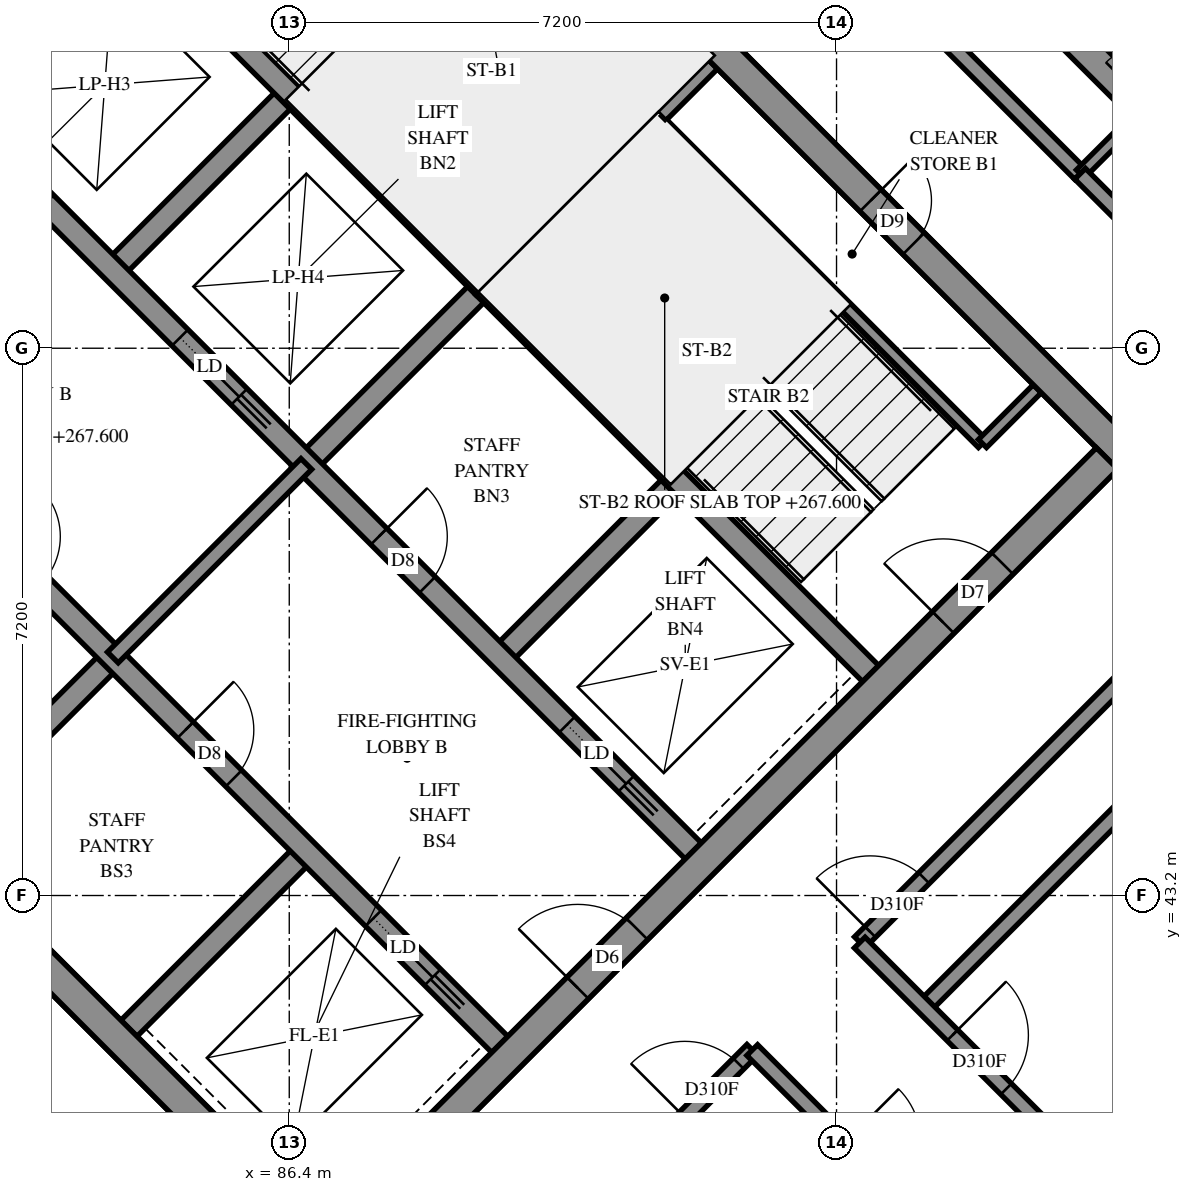
"""IFC4 building model, lengths in metres.
Left out: names, types, materials, properties, quantities, classifications, styles, units other than length and angle.
Written with IfcOpenShell. Run it as: python <this file> out.ifc"""

import sys

from ifc_helpers import new_model, si_unit, direction, frame, frame_2d, origin, place, context, subcontext, project, spatial, rectangle, extrude, element, fill, save


model = new_model("IFC4")
c1 = context("Model", 3, precision=1e-05, world=origin(), true_north=direction((0.0, 1.0)))
c2 = subcontext(c1, "Body", "Model", "MODEL_VIEW")
j1 = project(units=[si_unit("LENGTHUNIT", "METRE"), si_unit("PLANEANGLEUNIT", "RADIAN")], contexts=[c1])
p1 = place(None, origin())
s1 = spatial("IfcSite", under=j1, at=p1, CompositionType="ELEMENT")
p2 = place(p1, origin())
s2 = spatial("IfcBuilding", under=s1, at=p2, CompositionType="ELEMENT")
p3 = place(p2, frame((0.0, 0.0, 267.6)))
s3 = spatial("IfcBuildingStorey", under=s2, at=p3, CompositionType="ELEMENT", Elevation=267.6)
p4 = place(p3, frame((76.23, 49.231, -0.3), z_axis=(0.0, 0.0, 1.0), x_axis=(0.7071034917, -0.7071100706, 0.0)))
e1 = element("IfcWall", 1, at=p4, inside=s3, PredefinedType="SHEAR", context=c2, shape_type="SweptSolid", body=[
    extrude(rectangle(XDim=15.2, YDim=0.4, at=frame_2d((7.6, 0.0))), origin(), (0.0, 0.0, 1.0), 2.7),
])
p5 = place(p3, frame((86.695, 59.696, -0.3), z_axis=(0.0, 0.0, 1.0), x_axis=(0.7071100706, -0.7071034917, 0.0)))
e2 = element("IfcWall", 2, at=p5, inside=s3, PredefinedType="SHEAR", context=c2, shape_type="SweptSolid", body=[
    extrude(rectangle(XDim=15.2, YDim=0.4, at=frame_2d((7.6, 0.0))), origin(), (0.0, 0.0, 1.0), 2.7),
])
p6 = place(p5, frame((10.4, 0.0, 0.3)))
e3 = element("IfcOpeningElement", 3, at=p6, cuts=e2, PredefinedType="OPENING", context=c2, shape_type="SweptSolid", body=[
    extrude(rectangle(XDim=0.8, YDim=2.1, at=frame_2d((0.4, 1.05))), frame((0.0, 0.21, 0.0), z_axis=(0.0, -1.0, 0.0), x_axis=(1.0, 0.0, 0.0)), (0.0, 0.0, 1.0), 0.42),
])
p7 = place(p3, frame((76.513, 49.231, -0.3), z_axis=(0.0, 0.0, 1.0), x_axis=(0.7071067812, 0.7071067812, 0.0)))
e4 = element("IfcWall", 4, at=p7, inside=s3, PredefinedType="SHEAR", context=c2, shape_type="SweptSolid", body=[
    extrude(rectangle(XDim=14.4, YDim=0.4, at=frame_2d((7.2, 0.0))), origin(), (0.0, 0.0, 1.0), 2.7),
])
p8 = place(p7, frame((5.65, 0.0, 0.3)))
e5 = element("IfcOpeningElement", 5, at=p8, cuts=e4, PredefinedType="OPENING", context=c2, shape_type="SweptSolid", body=[
    extrude(rectangle(XDim=1.1, YDim=2.1, at=frame_2d((0.55, 1.05))), frame((0.0, 0.21, 0.0), z_axis=(0.0, -1.0, 0.0), x_axis=(1.0, 0.0, 0.0)), (0.0, 0.0, 1.0), 0.42),
])
p9 = place(p7, frame((11.35, 0.0, 0.3)))
e6 = element("IfcOpeningElement", 6, at=p9, cuts=e4, PredefinedType="OPENING", context=c2, shape_type="SweptSolid", body=[
    extrude(rectangle(XDim=1.1, YDim=2.1, at=frame_2d((0.55, 1.05))), frame((0.0, 0.21, 0.0), z_axis=(0.0, -1.0, 0.0), x_axis=(1.0, 0.0, 0.0)), (0.0, 0.0, 1.0), 0.42),
])
p10 = place(p7, frame((0.25, 0.0, 0.0)))
e7 = element("IfcOpeningElement", 7, at=p10, cuts=e4, PredefinedType="OPENING", context=c2, shape_type="SweptSolid", body=[
    extrude(rectangle(XDim=0.9, YDim=2.1, at=frame_2d((0.45, 1.05))), frame((0.0, 0.21, 0.0), z_axis=(0.0, -1.0, 0.0), x_axis=(1.0, 0.0, 0.0)), (0.0, 0.0, 1.0), 0.42),
])
p11 = place(p3, frame((86.978, 38.766, -0.3), z_axis=(0.0, 0.0, 1.0), x_axis=(0.7071067812, 0.7071067812, 0.0)))
e8 = element("IfcWall", 8, at=p11, inside=s3, PredefinedType="SHEAR", context=c2, shape_type="SweptSolid", body=[
    extrude(rectangle(XDim=14.4, YDim=0.4, at=frame_2d((7.2, 0.0))), origin(), (0.0, 0.0, 1.0), 2.7),
])
p12 = place(p11, frame((4.55, 0.0, 0.3)))
e9 = element("IfcOpeningElement", 9, at=p12, cuts=e8, PredefinedType="OPENING", context=c2, shape_type="SweptSolid", body=[
    extrude(rectangle(XDim=1.1, YDim=2.1, at=frame_2d((0.55, 1.05))), frame((0.0, 0.21, 0.0), z_axis=(0.0, -1.0, 0.0), x_axis=(1.0, 0.0, 0.0)), (0.0, 0.0, 1.0), 0.42),
])
p13 = place(p11, frame((11.35, 0.0, 0.3)))
e10 = element("IfcOpeningElement", 10, at=p13, cuts=e8, PredefinedType="OPENING", context=c2, shape_type="SweptSolid", body=[
    extrude(rectangle(XDim=1.1, YDim=2.1, at=frame_2d((0.55, 1.05))), frame((0.0, 0.21, 0.0), z_axis=(0.0, -1.0, 0.0), x_axis=(1.0, 0.0, 0.0)), (0.0, 0.0, 1.0), 0.42),
])
p14 = place(p3, frame((84.079, 51.423, 0.0), z_axis=(0.0, 0.0, 1.0), x_axis=(0.7071219326, 0.7070916295, 0.0)))
e11 = element("IfcWall", 11, at=p14, inside=s3, PredefinedType="SOLIDWALL", context=c2, shape_type="SweptSolid", body=[
    extrude(rectangle(XDim=3.3, YDim=0.3, at=frame_2d((1.65, 0.0))), origin(), (0.0, 0.0, 1.0), 3.1),
])
p15 = place(p3, frame((81.746, 43.999, 0.0), z_axis=(0.0, 0.0, 1.0), x_axis=(0.7071067812, 0.7071067812, 0.0)))
e12 = element("IfcWall", 12, at=p15, inside=s3, PredefinedType="SOLIDWALL", context=c2, shape_type="SweptSolid", body=[
    extrude(rectangle(XDim=3.3, YDim=0.3, at=frame_2d((1.65, 0.0))), origin(), (0.0, 0.0, 1.0), 3.1),
])
p16 = place(p3, frame((86.625, 48.878, 0.0), z_axis=(0.0, 0.0, 1.0), x_axis=(0.7071067812, 0.7071067812, 0.0)))
e13 = element("IfcWall", 13, at=p16, inside=s3, PredefinedType="SOLIDWALL", context=c2, shape_type="SweptSolid", body=[
    extrude(rectangle(XDim=3.3, YDim=0.3, at=frame_2d((1.65, 0.0))), origin(), (0.0, 0.0, 1.0), 3.1),
])
p17 = place(p3, frame((84.291, 41.453, 0.0), z_axis=(0.0, 0.0, 1.0), x_axis=(0.7071067812, 0.7071067812, 0.0)))
e14 = element("IfcWall", 14, at=p17, inside=s3, PredefinedType="SOLIDWALL", context=c2, shape_type="SweptSolid", body=[
    extrude(rectangle(XDim=3.3, YDim=0.3, at=frame_2d((1.65, 0.0))), origin(), (0.0, 0.0, 1.0), 3.1),
])
p18 = place(p3, frame((89.17, 46.332, 0.0), z_axis=(0.0, 0.0, 1.0), x_axis=(0.7071067812, 0.7071067812, 0.0)))
e15 = element("IfcWall", 15, at=p18, inside=s3, PredefinedType="SOLIDWALL", context=c2, shape_type="SweptSolid", body=[
    extrude(rectangle(XDim=3.3, YDim=0.3, at=frame_2d((1.65, 0.0))), origin(), (0.0, 0.0, 1.0), 3.1),
])
p19 = place(p3, frame((78.988, 51.423, 0.0), z_axis=(0.0, 0.0, 1.0), x_axis=(0.7071067812, -0.7071067812, 0.0)))
e16 = element("IfcWall", 16, at=p19, inside=s3, PredefinedType="SOLIDWALL", context=c2, shape_type="SweptSolid", body=[
    extrude(rectangle(XDim=14.4, YDim=0.3, at=frame_2d((7.2, 0.0))), origin(), (0.0, 0.0, 1.0), 3.1),
])
p20 = place(p19, frame((4.95, 0.0, 0.0)))
e17 = element("IfcOpeningElement", 17, at=p20, cuts=e16, PredefinedType="OPENING", context=c2, shape_type="SweptSolid", body=[
    extrude(rectangle(XDim=0.9, YDim=2.1, at=frame_2d((0.45, 1.05))), frame((0.0, 0.16, 0.0), z_axis=(0.0, -1.0, 0.0), x_axis=(1.0, 0.0, 0.0)), (0.0, 0.0, 1.0), 0.32),
])
p21 = place(p19, frame((8.55, 0.0, 0.0)))
e18 = element("IfcOpeningElement", 18, at=p21, cuts=e16, PredefinedType="OPENING", context=c2, shape_type="SweptSolid", body=[
    extrude(rectangle(XDim=0.9, YDim=2.1, at=frame_2d((0.45, 1.05))), frame((0.0, 0.16, 0.0), z_axis=(0.0, -1.0, 0.0), x_axis=(1.0, 0.0, 0.0)), (0.0, 0.0, 1.0), 0.32),
])
p22 = place(p19, frame((12.05, 0.0, 0.0)))
e19 = element("IfcOpeningElement", 19, at=p22, cuts=e16, PredefinedType="OPENING", context=c2, shape_type="SweptSolid", body=[
    extrude(rectangle(XDim=1.1, YDim=2.1, at=frame_2d((0.55, 1.05))), frame((0.0, 0.16, 0.0), z_axis=(0.0, -1.0, 0.0), x_axis=(1.0, 0.0, 0.0)), (0.0, 0.0, 1.0), 0.32),
])
p23 = place(p3, frame((81.534, 53.969, 0.0), z_axis=(0.0, 0.0, 1.0), x_axis=(0.707103309, -0.7071102534, 0.0)))
e20 = element("IfcWall", 20, at=p23, inside=s3, PredefinedType="SOLIDWALL", context=c2, shape_type="SweptSolid", body=[
    extrude(rectangle(XDim=14.4, YDim=0.3, at=frame_2d((7.2, 0.0))), origin(), (0.0, 0.0, 1.0), 3.1),
])
p24 = place(p23, frame((8.55, 0.0, 0.0)))
e21 = element("IfcOpeningElement", 21, at=p24, cuts=e20, PredefinedType="OPENING", context=c2, shape_type="SweptSolid", body=[
    extrude(rectangle(XDim=0.9, YDim=2.1, at=frame_2d((0.45, 1.05))), frame((0.0, 0.16, 0.0), z_axis=(0.0, -1.0, 0.0), x_axis=(1.0, 0.0, 0.0)), (0.0, 0.0, 1.0), 0.32),
])
p25 = place(p23, frame((1.25, 0.0, 0.0)))
e22 = element("IfcOpeningElement", 22, at=p25, cuts=e20, PredefinedType="OPENING", context=c2, shape_type="SweptSolid", body=[
    extrude(rectangle(XDim=1.1, YDim=2.1, at=frame_2d((0.55, 1.05))), frame((0.0, 0.16, 0.0), z_axis=(0.0, -1.0, 0.0), x_axis=(1.0, 0.0, 0.0)), (0.0, 0.0, 1.0), 0.32),
])
p26 = place(p23, frame((4.85, 0.0, 0.0)))
e23 = element("IfcOpeningElement", 23, at=p26, cuts=e20, PredefinedType="OPENING", context=c2, shape_type="SweptSolid", body=[
    extrude(rectangle(XDim=1.1, YDim=2.1, at=frame_2d((0.55, 1.05))), frame((0.0, 0.16, 0.0), z_axis=(0.0, -1.0, 0.0), x_axis=(1.0, 0.0, 0.0)), (0.0, 0.0, 1.0), 0.32),
])
p27 = place(p23, frame((12.05, 0.0, 0.0)))
e24 = element("IfcOpeningElement", 24, at=p27, cuts=e20, PredefinedType="OPENING", context=c2, shape_type="SweptSolid", body=[
    extrude(rectangle(XDim=1.1, YDim=2.1, at=frame_2d((0.55, 1.05))), frame((0.0, 0.16, 0.0), z_axis=(0.0, -1.0, 0.0), x_axis=(1.0, 0.0, 0.0)), (0.0, 0.0, 1.0), 0.32),
])
for number, where, z_axis, x_axis in (
    (25, (83.867, 56.302, 0.0), (0.0, 0.0, 1.0), (0.707, -0.707, 0.0)),
    (26, (88.958, 51.211, 0.0), (0.0, 0.0, 1.0), (0.707, -0.707, 0.0)),
):
    element("IfcWall", number, at=place(p3, frame(where, z_axis=z_axis, x_axis=x_axis)), inside=s3, PredefinedType="SOLIDWALL", context=c2, shape_type="SweptSolid", body=[
        extrude(rectangle(XDim=7.2, YDim=0.3, at=frame_2d((3.6, 0.0))), origin(), (0.0, 0.0, 1.0), 3.1),
    ])
p28 = place(p3, frame((88.958, 51.211, 0.0), z_axis=(0.0, 0.0, 1.0), x_axis=(0.7071067812, 0.7071067812, 0.0)))
e27 = element("IfcWall", 27, at=p28, inside=s3, PredefinedType="SOLIDWALL", context=c2, shape_type="SweptSolid", body=[
    extrude(rectangle(XDim=4.2, YDim=0.3, at=frame_2d((2.1, 0.0))), origin(), (0.0, 0.0, 1.0), 3.1),
])
p29 = place(p3, frame((91.313, 53.354, 0.0), z_axis=(0.0, 0.0, 1.0), x_axis=(0.7071067812, -0.7071067812, 0.0)))
e28 = element("IfcWall", 28, at=p29, inside=s3, PredefinedType="PARTITIONING", context=c2, shape_type="SweptSolid", body=[
    extrude(rectangle(XDim=5.95, YDim=0.15, at=frame_2d((2.975, 0.0))), origin(), (0.0, 0.0, 1.0), 3.1),
])
p30 = place(p3, frame((95.52, 49.146, 0.0), z_axis=(0.0, 0.0, 1.0), x_axis=(0.7071067812, 0.7071067812, 0.0)))
e29 = element("IfcWall", 29, at=p30, inside=s3, PredefinedType="PARTITIONING", context=c2, shape_type="SweptSolid", body=[
    extrude(rectangle(XDim=1.02, YDim=0.15, at=frame_2d((0.51, 0.0))), origin(), (0.0, 0.0, 1.0), 3.1),
])
p31 = place(p3, frame((84.079, 46.332, 0.0), z_axis=(0.0, 0.0, 1.0), x_axis=(0.7071067812, 0.7071067812, 0.0)))
e30 = element("IfcWall", 30, at=p31, inside=s3, PredefinedType="PARTITIONING", context=c2, shape_type="SweptSolid", body=[
    extrude(rectangle(XDim=3.6, YDim=0.2, at=frame_2d((1.8, 0.0))), origin(), (0.0, 0.0, 1.0), 3.1),
])
p32 = place(p3, frame((84.965, 31.946, 0.0), z_axis=(0.0, 0.0, 1.0), x_axis=(0.7070265824, 0.7071869709, 0.0)))
e31 = element("IfcWall", 31, at=p32, inside=s3, PredefinedType="PARTITIONING", context=c2, shape_type="SweptSolid", body=[
    extrude(rectangle(XDim=11.846, YDim=0.2, at=frame_2d((5.923, 0.0))), origin(), (0.0, 0.0, 1.0), 3.1),
])
p33 = place(p3, frame((93.907, 42.585, 0.0), z_axis=(0.0, 0.0, 1.0), x_axis=(0.7071067812, 0.7071067812, 0.0)))
e32 = element("IfcWall", 32, at=p33, inside=s3, PredefinedType="PARTITIONING", context=c2, shape_type="SweptSolid", body=[
    extrude(rectangle(XDim=9.201, YDim=0.2, at=frame_2d((4.601, 0.0))), origin(), (0.0, 0.0, 1.0), 3.1),
])
p34 = place(p33, frame((0.193, 0.0, 0.0)))
e33 = element("IfcOpeningElement", 33, at=p34, cuts=e32, PredefinedType="OPENING", context=c2, shape_type="SweptSolid", body=[
    extrude(rectangle(XDim=1.0, YDim=2.1, at=frame_2d((0.5, 1.05))), frame((0.0, 0.11, 0.0), z_axis=(0.0, -1.0, 0.0), x_axis=(1.0, 0.0, 0.0)), (0.0, 0.0, 1.0), 0.22),
])
p35 = place(p3, frame((80.747, 41.597, 0.0), z_axis=(0.0, 0.0, 1.0), x_axis=(0.7071067812, -0.7071067812, 0.0)))
e34 = element("IfcWall", 34, at=p35, inside=s3, PredefinedType="PARTITIONING", context=c2, shape_type="SweptSolid", body=[
    extrude(rectangle(XDim=8.607, YDim=0.2, at=frame_2d((4.303, 0.0))), origin(), (0.0, 0.0, 1.0), 3.1),
])
p36 = place(p35, frame((0.195, 0.0, 0.0)))
e35 = element("IfcOpeningElement", 35, at=p36, cuts=e34, PredefinedType="OPENING", context=c2, shape_type="SweptSolid", body=[
    extrude(rectangle(XDim=1.0, YDim=2.1, at=frame_2d((0.5, 1.05))), frame((0.0, 0.11, 0.0), z_axis=(0.0, -1.0, 0.0), x_axis=(1.0, 0.0, 0.0)), (0.0, 0.0, 1.0), 0.22),
])
p37 = place(p35, frame((3.175, 0.0, 0.0)))
e36 = element("IfcOpeningElement", 36, at=p37, cuts=e34, PredefinedType="OPENING", context=c2, shape_type="SweptSolid", body=[
    extrude(rectangle(XDim=1.0, YDim=2.1, at=frame_2d((0.5, 1.05))), frame((0.0, 0.11, 0.0), z_axis=(0.0, -1.0, 0.0), x_axis=(1.0, 0.0, 0.0)), (0.0, 0.0, 1.0), 0.22),
])
p38 = place(p3, frame((86.836, 35.514, 0.0), z_axis=(0.0, 0.0, 1.0), x_axis=(0.7071067812, 0.7071067812, 0.0)))
e37 = element("IfcWall", 37, at=p38, inside=s3, PredefinedType="PARTITIONING", context=c2, shape_type="SweptSolid", body=[
    extrude(rectangle(XDim=7.999, YDim=0.2, at=frame_2d((3.999, 0.0))), origin(), (0.0, 0.0, 1.0), 3.1),
])
p39 = place(p38, frame((6.742, 0.0, 0.0)))
e38 = element("IfcOpeningElement", 38, at=p39, cuts=e37, PredefinedType="OPENING", context=c2, shape_type="SweptSolid", body=[
    extrude(rectangle(XDim=1.0, YDim=2.1, at=frame_2d((0.5, 1.05))), frame((0.0, 0.11, 0.0), z_axis=(0.0, -1.0, 0.0), x_axis=(1.0, 0.0, 0.0)), (0.0, 0.0, 1.0), 0.22),
])
p40 = place(p3, frame((94.755, 41.737, 0.0), z_axis=(0.0, 0.0, 1.0), x_axis=(0.7071146549, 0.7070989073, 0.0)))
e39 = element("IfcWall", 39, at=p40, inside=s3, PredefinedType="PARTITIONING", context=c2, shape_type="SweptSolid", body=[
    extrude(rectangle(XDim=6.35, YDim=0.2, at=frame_2d((3.175, 0.0))), origin(), (0.0, 0.0, 1.0), 3.1),
])
p41 = place(p3, frame((93.905, 42.581, 0.0), z_axis=(0.0, 0.0, 1.0), x_axis=(0.7071067812, -0.7071067812, 0.0)))
e40 = element("IfcWall", 40, at=p41, inside=s3, PredefinedType="PARTITIONING", context=c2, shape_type="SweptSolid", body=[
    extrude(rectangle(XDim=4.8, YDim=0.2, at=frame_2d((2.4, 0.0))), origin(), (0.0, 0.0, 1.0), 3.1),
])
p42 = place(p41, frame((1.725, 0.0, 0.0)))
e41 = element("IfcOpeningElement", 41, at=p42, cuts=e40, PredefinedType="OPENING", context=c2, shape_type="SweptSolid", body=[
    extrude(rectangle(XDim=1.0, YDim=2.1, at=frame_2d((0.5, 1.05))), frame((0.0, 0.11, 0.0), z_axis=(0.0, -1.0, 0.0), x_axis=(1.0, 0.0, 0.0)), (0.0, 0.0, 1.0), 0.22),
])
p43 = place(p3, frame((92.491, 41.167, 0.0), z_axis=(0.0, 0.0, 1.0), x_axis=(0.7071067812, -0.7071067812, 0.0)))
e42 = element("IfcWall", 42, at=p43, inside=s3, PredefinedType="PARTITIONING", context=c2, shape_type="SweptSolid", body=[
    extrude(rectangle(XDim=4.8, YDim=0.2, at=frame_2d((2.4, 0.0))), origin(), (0.0, 0.0, 1.0), 3.1),
])
p44 = place(p43, frame((1.725, 0.0, 0.0)))
e43 = element("IfcOpeningElement", 43, at=p44, cuts=e42, PredefinedType="OPENING", context=c2, shape_type="SweptSolid", body=[
    extrude(rectangle(XDim=1.0, YDim=2.1, at=frame_2d((0.5, 1.05))), frame((0.0, 0.11, 0.0), z_axis=(0.0, -1.0, 0.0), x_axis=(1.0, 0.0, 0.0)), (0.0, 0.0, 1.0), 0.22),
])
p45 = place(p3, frame((93.621, 55.875, 0.0), z_axis=(0.0, 0.0, 1.0), x_axis=(0.7071067812, -0.7071067812, 0.0)))
e44 = element("IfcWall", 44, at=p45, inside=s3, PredefinedType="PARTITIONING", context=c2, shape_type="SweptSolid", body=[
    extrude(rectangle(XDim=4.5, YDim=0.2, at=frame_2d((2.25, 0.0))), origin(), (0.0, 0.0, 1.0), 3.1),
])
p46 = place(p45, frame((0.467, 0.0, 0.0)))
e45 = element("IfcOpeningElement", 45, at=p46, cuts=e44, PredefinedType="OPENING", context=c2, shape_type="SweptSolid", body=[
    extrude(rectangle(XDim=0.9, YDim=2.1, at=frame_2d((0.45, 1.05))), frame((0.0, 0.11, 0.0), z_axis=(0.0, -1.0, 0.0), x_axis=(1.0, 0.0, 0.0)), (0.0, 0.0, 1.0), 0.22),
])
p47 = place(p3, frame((97.301, 39.191, 0.0), z_axis=(0.0, 0.0, 1.0), x_axis=(0.7071067812, 0.7071067812, 0.0)))
e46 = element("IfcWall", 46, at=p47, inside=s3, PredefinedType="PARTITIONING", context=c2, shape_type="SweptSolid", body=[
    extrude(rectangle(XDim=2.707, YDim=0.2, at=frame_2d((1.353, 0.0))), origin(), (0.0, 0.0, 1.0), 2.6),
])
p48 = place(p3, frame((96.809, 52.693, 0.0), z_axis=(0.0, 0.0, 1.0), x_axis=(0.7075441989, 0.7066690927, 0.0)))
e47 = element("IfcWall", 47, at=p48, inside=s3, PredefinedType="PARTITIONING", context=c2, shape_type="SweptSolid", body=[
    extrude(rectangle(XDim=2.4, YDim=0.15, at=frame_2d((1.2, 0.0))), origin(), (0.0, 0.0, 1.0), 3.1),
])
p49 = place(p48, frame((1.275, 0.0, 0.0)))
e48 = element("IfcOpeningElement", 48, at=p49, cuts=e47, PredefinedType="OPENING", context=c2, shape_type="SweptSolid", body=[
    extrude(rectangle(XDim=0.8, YDim=2.1, at=frame_2d((0.4, 1.05))), frame((0.0, 0.085, 0.0), z_axis=(0.0, -1.0, 0.0), x_axis=(1.0, 0.0, 0.0)), (0.0, 0.0, 1.0), 0.17),
])
p50 = place(p3, frame((96.805, 52.695, 0.0), z_axis=(0.0, 0.0, 1.0), x_axis=(0.7073923078, -0.7068211392, 0.0)))
e49 = element("IfcWall", 49, at=p50, inside=s3, PredefinedType="PARTITIONING", context=c2, shape_type="SweptSolid", body=[
    extrude(rectangle(XDim=1.751, YDim=0.2, at=frame_2d((0.875, 0.0))), origin(), (0.0, 0.0, 1.0), 3.1),
])
p51 = place(p6, origin())
e50 = element("IfcDoor", 50, at=p51, inside=s3, OperationType="SINGLE_SWING_RIGHT", PredefinedType="DOOR", context=c2, shape_type="SweptSolid", body=[
    extrude(rectangle(XDim=0.8, YDim=2.1, at=frame_2d((0.4, 1.05))), frame((0.0, 0.025, 0.0), z_axis=(0.0, -1.0, 0.0), x_axis=(1.0, 0.0, 0.0)), (0.0, 0.0, 1.0), 0.05),
])
fill(e3, e50)
p52 = place(p12, origin())
e51 = element("IfcDoor", 51, at=p52, inside=s3, OperationType="DOUBLE_DOOR_SINGLE_SWING", PredefinedType="DOOR", context=c2, shape_type="SweptSolid", body=[
    extrude(rectangle(XDim=1.1, YDim=2.1, at=frame_2d((0.55, 1.05))), frame((0.0, 0.025, 0.0), z_axis=(0.0, -1.0, 0.0), x_axis=(1.0, 0.0, 0.0)), (0.0, 0.0, 1.0), 0.05),
])
fill(e9, e51)
p53 = place(p13, origin())
e52 = element("IfcDoor", 52, at=p53, inside=s3, OperationType="SINGLE_SWING_RIGHT", PredefinedType="DOOR", context=c2, shape_type="SweptSolid", body=[
    extrude(rectangle(XDim=1.1, YDim=2.1, at=frame_2d((0.55, 1.05))), frame((0.0, 0.025, 0.0), z_axis=(0.0, -1.0, 0.0), x_axis=(1.0, 0.0, 0.0)), (0.0, 0.0, 1.0), 0.05),
])
fill(e10, e52)
p54 = place(p21, origin())
e53 = element("IfcDoor", 53, at=p54, inside=s3, OperationType="SINGLE_SWING_LEFT", PredefinedType="DOOR", context=c2, shape_type="SweptSolid", body=[
    extrude(rectangle(XDim=0.9, YDim=2.1, at=frame_2d((0.45, 1.05))), frame((0.0, 0.025, 0.0), z_axis=(0.0, -1.0, 0.0), x_axis=(1.0, 0.0, 0.0)), (0.0, 0.0, 1.0), 0.05),
])
fill(e18, e53)
p55 = place(p24, origin())
e54 = element("IfcDoor", 54, at=p55, inside=s3, OperationType="SINGLE_SWING_LEFT", PredefinedType="DOOR", context=c2, shape_type="SweptSolid", body=[
    extrude(rectangle(XDim=0.9, YDim=2.1, at=frame_2d((0.45, 1.05))), frame((0.0, 0.025, 0.0), z_axis=(0.0, -1.0, 0.0), x_axis=(1.0, 0.0, 0.0)), (0.0, 0.0, 1.0), 0.05),
])
fill(e21, e54)
p56 = place(p22, origin())
e55 = element("IfcDoor", 55, at=p56, inside=s3, OperationType="SLIDING_TO_RIGHT", PredefinedType="DOOR", context=c2, shape_type="SweptSolid", body=[
    extrude(rectangle(XDim=1.1, YDim=2.1, at=frame_2d((0.55, 1.05))), frame((0.0, 0.025, 0.0), z_axis=(0.0, -1.0, 0.0), x_axis=(1.0, 0.0, 0.0)), (0.0, 0.0, 1.0), 0.05),
])
fill(e19, e55)
p57 = place(p26, origin())
e56 = element("IfcDoor", 56, at=p57, inside=s3, OperationType="SLIDING_TO_RIGHT", PredefinedType="DOOR", context=c2, shape_type="SweptSolid", body=[
    extrude(rectangle(XDim=1.1, YDim=2.1, at=frame_2d((0.55, 1.05))), frame((0.0, 0.025, 0.0), z_axis=(0.0, -1.0, 0.0), x_axis=(1.0, 0.0, 0.0)), (0.0, 0.0, 1.0), 0.05),
])
fill(e23, e56)
p58 = place(p27, origin())
e57 = element("IfcDoor", 57, at=p58, inside=s3, OperationType="SLIDING_TO_RIGHT", PredefinedType="DOOR", context=c2, shape_type="SweptSolid", body=[
    extrude(rectangle(XDim=1.1, YDim=2.1, at=frame_2d((0.55, 1.05))), frame((0.0, 0.025, 0.0), z_axis=(0.0, -1.0, 0.0), x_axis=(1.0, 0.0, 0.0)), (0.0, 0.0, 1.0), 0.05),
])
fill(e24, e57)
p59 = place(p34, origin())
e58 = element("IfcDoor", 58, at=p59, inside=s3, OperationType="SINGLE_SWING_LEFT", PredefinedType="DOOR", context=c2, shape_type="SweptSolid", body=[
    extrude(rectangle(XDim=1.0, YDim=2.1, at=frame_2d((0.5, 1.05))), frame((0.0, 0.025, 0.0), z_axis=(0.0, -1.0, 0.0), x_axis=(1.0, 0.0, 0.0)), (0.0, 0.0, 1.0), 0.05),
])
fill(e33, e58)
p60 = place(p39, origin())
e59 = element("IfcDoor", 59, at=p60, inside=s3, OperationType="SINGLE_SWING_RIGHT", PredefinedType="DOOR", context=c2, shape_type="SweptSolid", body=[
    extrude(rectangle(XDim=1.0, YDim=2.1, at=frame_2d((0.5, 1.05))), frame((0.0, 0.025, 0.0), z_axis=(0.0, -1.0, 0.0), x_axis=(1.0, 0.0, 0.0)), (0.0, 0.0, 1.0), 0.05),
])
fill(e38, e59)
p61 = place(p42, origin())
e60 = element("IfcDoor", 60, at=p61, inside=s3, OperationType="SINGLE_SWING_RIGHT", PredefinedType="DOOR", context=c2, shape_type="SweptSolid", body=[
    extrude(rectangle(XDim=1.0, YDim=2.1, at=frame_2d((0.5, 1.05))), frame((0.0, 0.025, 0.0), z_axis=(0.0, -1.0, 0.0), x_axis=(1.0, 0.0, 0.0)), (0.0, 0.0, 1.0), 0.05),
])
fill(e41, e60)
save(model, sys.argv[1])
